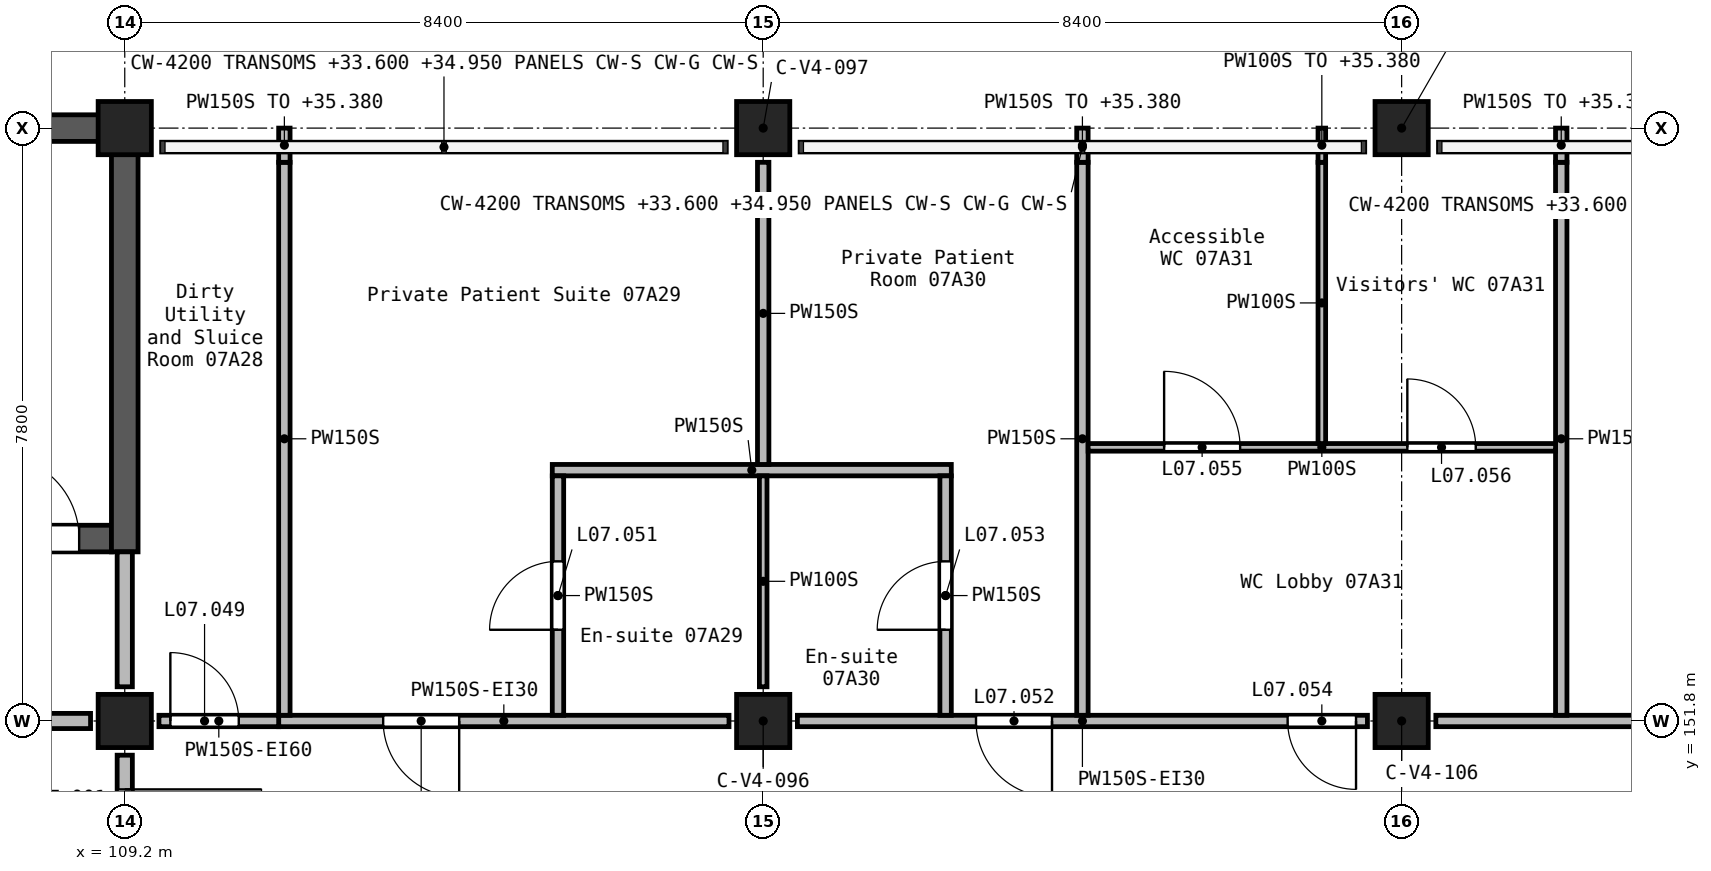
"""IFC4 building model, lengths in metres.
Left out: names, types, materials, properties, quantities, classifications, styles, units other than length and angle.
Written with IfcOpenShell. Run it as: python <this file> out.ifc"""

import sys

from ifc_helpers import new_model, si_unit, direction, frame, frame_2d, origin, origin_2d, place, context, subcontext, project, spatial, rectangle, extrude, element, fill, save


model = new_model("IFC4")
c1 = context("Model", 3, precision=1e-05, world=origin(), true_north=direction((0.0, 1.0)))
c2 = subcontext(c1, "Body", "Model", "MODEL_VIEW")
j1 = project(units=[si_unit("LENGTHUNIT", "METRE"), si_unit("PLANEANGLEUNIT", "RADIAN")], contexts=[c1])
p1 = place(None, origin())
s1 = spatial("IfcSite", under=j1, at=p1, CompositionType="ELEMENT")
p2 = place(p1, origin())
s2 = spatial("IfcBuilding", under=s1, at=p2, CompositionType="ELEMENT")
p3 = place(p2, frame((0.0, 0.0, 32.7)))
s3 = spatial("IfcBuildingStorey", under=s2, at=p3, CompositionType="ELEMENT", Elevation=32.7)
for number, where, z_axis, x_axis in (
    (1, (109.2, 151.8, 0.0), (0.0, 0.0, 1.0), (1.0, 0.0, 0.0)),
    (2, (109.2, 159.6, 0.0), (0.0, 0.0, 1.0), (1.0, 0.0, 0.0)),
    (3, (117.6, 151.8, 0.0), (0.0, 0.0, 1.0), (1.0, 0.0, 0.0)),
    (4, (117.6, 159.6, 0.0), (0.0, 0.0, 1.0), (1.0, 0.0, 0.0)),
    (5, (126.0, 151.8, 0.0), (0.0, 0.0, 1.0), (1.0, 0.0, 0.0)),
    (6, (126.0, 159.6, 0.0), (0.0, 0.0, 1.0), (1.0, 0.0, 0.0)),
):
    element("IfcColumn", number, at=place(p3, frame(where, z_axis=z_axis, x_axis=x_axis)), inside=s3, PredefinedType="COLUMN", context=c2, shape_type="SweptSolid", body=[
        extrude(rectangle(XDim=0.7, YDim=0.7, at=origin_2d()), origin(), (0.0, 0.0, 1.0), 3.9),
    ])
p4 = place(p3, frame((100.625, 159.6, 0.0), z_axis=(0.0, 0.0, 1.0), x_axis=(1.0, 0.0, 0.0)))
e7 = element("IfcWall", 7, at=p4, inside=s3, PredefinedType="SHEAR", context=c2, shape_type="SweptSolid", body=[
    extrude(rectangle(XDim=8.4, YDim=0.35, at=frame_2d((4.2, 0.0))), origin(), (0.0, 0.0, 1.0), 3.9),
])
p5 = place(p3, frame((100.975, 154.2, 0.0), z_axis=(0.0, 0.0, 1.0), x_axis=(1.0, 0.0, 0.0)))
e8 = element("IfcWall", 8, at=p5, inside=s3, PredefinedType="SHEAR", context=c2, shape_type="SweptSolid", body=[
    extrude(rectangle(XDim=8.05, YDim=0.35, at=frame_2d((4.025, 0.0))), origin(), (0.0, 0.0, 1.0), 3.9),
])
p6 = place(p5, frame((6.525, 0.0, 0.0)))
e9 = element("IfcOpeningElement", 9, at=p6, cuts=e8, PredefinedType="OPENING", context=c2, shape_type="SweptSolid", body=[
    extrude(rectangle(XDim=1.1, YDim=2.1, at=frame_2d((0.55, 1.05))), frame((0.0, 0.185, 0.0), z_axis=(0.0, -1.0, 0.0), x_axis=(1.0, 0.0, 0.0)), (0.0, 0.0, 1.0), 0.37),
])
p7 = place(p3, frame((109.2, 154.025, 0.0), z_axis=(0.0, 0.0, 1.0), x_axis=(0.0, 1.0, 0.0)))
e10 = element("IfcWall", 10, at=p7, inside=s3, PredefinedType="SHEAR", context=c2, shape_type="SweptSolid", body=[
    extrude(rectangle(XDim=5.75, YDim=0.35, at=frame_2d((2.875, 0.0))), origin(), (0.0, 0.0, 1.0), 3.9),
])
p8 = place(p3, frame((109.2, 154.025, 0.0), z_axis=(0.0, 0.0, 1.0), x_axis=(0.0, -1.0, 0.0)))
e11 = element("IfcWall", 11, at=p8, inside=s3, PredefinedType="SOLIDWALL", context=c2, shape_type="SweptSolid", body=[
    extrude(rectangle(XDim=1.775, YDim=0.2, at=frame_2d((0.887, 0.0))), origin(), (0.0, 0.0, 1.0), 3.6),
])
p9 = place(p3, frame((109.2, 151.35, 0.0), z_axis=(0.0, 0.0, 1.0), x_axis=(0.0, -1.0, 0.0)))
e12 = element("IfcWall", 12, at=p9, inside=s3, PredefinedType="SOLIDWALL", context=c2, shape_type="SweptSolid", body=[
    extrude(rectangle(XDim=2.7, YDim=0.2, at=frame_2d((1.35, 0.0))), origin(), (0.0, 0.0, 1.0), 3.6),
])
p10 = place(p9, frame((0.45, 0.0, 0.0)))
e13 = element("IfcOpeningElement", 13, at=p10, cuts=e12, PredefinedType="OPENING", context=c2, shape_type="SweptSolid", body=[
    extrude(rectangle(XDim=1.8, YDim=2.1, at=frame_2d((0.9, 1.05))), frame((0.0, 0.11, 0.0), z_axis=(0.0, -1.0, 0.0), x_axis=(1.0, 0.0, 0.0)), (0.0, 0.0, 1.0), 0.22),
])
p11 = place(p3, frame((101.25, 151.8, 0.0), z_axis=(0.0, 0.0, 1.0), x_axis=(1.0, 0.0, 0.0)))
e14 = element("IfcWall", 14, at=p11, inside=s3, PredefinedType="SOLIDWALL", context=c2, shape_type="SweptSolid", body=[
    extrude(rectangle(XDim=7.5, YDim=0.2, at=frame_2d((3.75, 0.0))), origin(), (0.0, 0.0, 1.0), 3.6),
])
p12 = place(p11, frame((3.2, 0.0, 0.0)))
e15 = element("IfcOpeningElement", 15, at=p12, cuts=e14, PredefinedType="OPENING", context=c2, shape_type="SweptSolid", body=[
    extrude(rectangle(XDim=1.1, YDim=2.1, at=frame_2d((0.55, 1.05))), frame((0.0, 0.11, 0.0), z_axis=(0.0, -1.0, 0.0), x_axis=(1.0, 0.0, 0.0)), (0.0, 0.0, 1.0), 0.22),
])
p13 = place(p3, frame((133.95, 151.8, 0.0), z_axis=(0.0, 0.0, 1.0), x_axis=(-1.0, 0.0, 0.0)))
e16 = element("IfcWall", 16, at=p13, inside=s3, PredefinedType="PARTITIONING", context=c2, shape_type="SweptSolid", body=[
    extrude(rectangle(XDim=7.5, YDim=0.15, at=frame_2d((3.75, 0.0))), origin(), (0.0, 0.0, 1.0), 3.6),
])
p14 = place(p13, frame((3.55, 0.0, 0.0)))
e17 = element("IfcOpeningElement", 17, at=p14, cuts=e16, PredefinedType="OPENING", context=c2, shape_type="SweptSolid", body=[
    extrude(rectangle(XDim=1.0, YDim=2.1, at=frame_2d((0.5, 1.05))), frame((0.0, 0.085, 0.0), z_axis=(0.0, -1.0, 0.0), x_axis=(1.0, 0.0, 0.0)), (0.0, 0.0, 1.0), 0.17),
])
p15 = place(p3, frame((125.55, 151.8, 0.0), z_axis=(0.0, 0.0, 1.0), x_axis=(-1.0, 0.0, 0.0)))
e18 = element("IfcWall", 18, at=p15, inside=s3, PredefinedType="PARTITIONING", context=c2, shape_type="SweptSolid", body=[
    extrude(rectangle(XDim=7.5, YDim=0.15, at=frame_2d((3.75, 0.0))), origin(), (0.0, 0.0, 1.0), 3.6),
])
p16 = place(p15, frame((4.15, 0.0, 0.0)))
e19 = element("IfcOpeningElement", 19, at=p16, cuts=e18, PredefinedType="OPENING", context=c2, shape_type="SweptSolid", body=[
    extrude(rectangle(XDim=1.0, YDim=2.1, at=frame_2d((0.5, 1.05))), frame((0.0, 0.085, 0.0), z_axis=(0.0, -1.0, 0.0), x_axis=(1.0, 0.0, 0.0)), (0.0, 0.0, 1.0), 0.17),
])
p17 = place(p15, frame((0.15, 0.0, 0.0)))
e20 = element("IfcOpeningElement", 20, at=p17, cuts=e18, PredefinedType="OPENING", context=c2, shape_type="SweptSolid", body=[
    extrude(rectangle(XDim=0.9, YDim=2.1, at=frame_2d((0.45, 1.05))), frame((0.0, 0.085, 0.0), z_axis=(0.0, -1.0, 0.0), x_axis=(1.0, 0.0, 0.0)), (0.0, 0.0, 1.0), 0.17),
])
p18 = place(p3, frame((117.15, 151.8, 0.0), z_axis=(0.0, 0.0, 1.0), x_axis=(-1.0, 0.0, 0.0)))
e21 = element("IfcWall", 21, at=p18, inside=s3, PredefinedType="PARTITIONING", context=c2, shape_type="SweptSolid", body=[
    extrude(rectangle(XDim=5.925, YDim=0.15, at=frame_2d((2.962, 0.0))), origin(), (0.0, 0.0, 1.0), 3.6),
])
p19 = place(p18, frame((3.55, 0.0, 0.0)))
e22 = element("IfcOpeningElement", 22, at=p19, cuts=e21, PredefinedType="OPENING", context=c2, shape_type="SweptSolid", body=[
    extrude(rectangle(XDim=1.0, YDim=2.1, at=frame_2d((0.5, 1.05))), frame((0.0, 0.085, 0.0), z_axis=(0.0, -1.0, 0.0), x_axis=(1.0, 0.0, 0.0)), (0.0, 0.0, 1.0), 0.17),
])
p20 = place(p3, frame((109.65, 151.8, 0.0), z_axis=(0.0, 0.0, 1.0), x_axis=(1.0, 0.0, 0.0)))
e23 = element("IfcWall", 23, at=p20, inside=s3, PredefinedType="PARTITIONING", context=c2, shape_type="SweptSolid", body=[
    extrude(rectangle(XDim=1.575, YDim=0.15, at=frame_2d((0.788, 0.0))), origin(), (0.0, 0.0, 1.0), 3.6),
])
p21 = place(p20, frame((0.15, 0.0, 0.0)))
e24 = element("IfcOpeningElement", 24, at=p21, cuts=e23, PredefinedType="OPENING", context=c2, shape_type="SweptSolid", body=[
    extrude(rectangle(XDim=0.9, YDim=2.1, at=frame_2d((0.45, 1.05))), frame((0.0, 0.085, 0.0), z_axis=(0.0, -1.0, 0.0), x_axis=(1.0, 0.0, 0.0)), (0.0, 0.0, 1.0), 0.17),
])
p22 = place(p3, frame((111.3, 151.875, 0.0), z_axis=(0.0, 0.0, 1.0), x_axis=(0.0, 1.0, 0.0)))
e25 = element("IfcWall", 25, at=p22, inside=s3, PredefinedType="PARTITIONING", context=c2, shape_type="SweptSolid", body=[
    extrude(rectangle(XDim=7.275, YDim=0.15, at=frame_2d((3.637, 0.0))), origin(), (0.0, 0.0, 1.0), 3.6),
])
p23 = place(p3, frame((111.3, 159.15, 0.0), z_axis=(0.0, 0.0, 1.0), x_axis=(0.0, 1.0, 0.0)))
e26 = element("IfcWall", 26, at=p23, inside=s3, PredefinedType="PARTITIONING", context=c2, shape_type="SweptSolid", body=[
    extrude(rectangle(XDim=0.45, YDim=0.15, at=frame_2d((0.225, 0.0))), origin(), (0.0, 0.0, 1.0), 2.68),
])
p24 = place(p3, frame((121.8, 151.875, 0.0), z_axis=(0.0, 0.0, 1.0), x_axis=(0.0, 1.0, 0.0)))
e27 = element("IfcWall", 27, at=p24, inside=s3, PredefinedType="PARTITIONING", context=c2, shape_type="SweptSolid", body=[
    extrude(rectangle(XDim=7.275, YDim=0.15, at=frame_2d((3.637, 0.0))), origin(), (0.0, 0.0, 1.0), 3.6),
])
p25 = place(p3, frame((121.8, 159.15, 0.0), z_axis=(0.0, 0.0, 1.0), x_axis=(0.0, 1.0, 0.0)))
e28 = element("IfcWall", 28, at=p25, inside=s3, PredefinedType="PARTITIONING", context=c2, shape_type="SweptSolid", body=[
    extrude(rectangle(XDim=0.45, YDim=0.15, at=frame_2d((0.225, 0.0))), origin(), (0.0, 0.0, 1.0), 2.68),
])
p26 = place(p3, frame((128.1, 151.875, 0.0), z_axis=(0.0, 0.0, 1.0), x_axis=(0.0, 1.0, 0.0)))
e29 = element("IfcWall", 29, at=p26, inside=s3, PredefinedType="PARTITIONING", context=c2, shape_type="SweptSolid", body=[
    extrude(rectangle(XDim=7.275, YDim=0.15, at=frame_2d((3.637, 0.0))), origin(), (0.0, 0.0, 1.0), 3.6),
])
p27 = place(p3, frame((128.1, 159.15, 0.0), z_axis=(0.0, 0.0, 1.0), x_axis=(0.0, 1.0, 0.0)))
e30 = element("IfcWall", 30, at=p27, inside=s3, PredefinedType="PARTITIONING", context=c2, shape_type="SweptSolid", body=[
    extrude(rectangle(XDim=0.45, YDim=0.15, at=frame_2d((0.225, 0.0))), origin(), (0.0, 0.0, 1.0), 2.68),
])
p28 = place(p3, frame((114.825, 155.1, 0.0), z_axis=(0.0, 0.0, 1.0), x_axis=(1.0, 0.0, 0.0)))
e31 = element("IfcWall", 31, at=p28, inside=s3, PredefinedType="PARTITIONING", context=c2, shape_type="SweptSolid", body=[
    extrude(rectangle(XDim=5.25, YDim=0.15, at=frame_2d((2.625, 0.0))), origin(), (0.0, 0.0, 1.0), 3.6),
])
p29 = place(p3, frame((117.6, 155.175, 0.0), z_axis=(0.0, 0.0, 1.0), x_axis=(0.0, 1.0, 0.0)))
e32 = element("IfcWall", 32, at=p29, inside=s3, PredefinedType="PARTITIONING", context=c2, shape_type="SweptSolid", body=[
    extrude(rectangle(XDim=3.975, YDim=0.15, at=frame_2d((1.987, 0.0))), origin(), (0.0, 0.0, 1.0), 3.6),
])
p30 = place(p3, frame((114.9, 151.875, 0.0), z_axis=(0.0, 0.0, 1.0), x_axis=(0.0, 1.0, 0.0)))
e33 = element("IfcWall", 33, at=p30, inside=s3, PredefinedType="PARTITIONING", context=c2, shape_type="SweptSolid", body=[
    extrude(rectangle(XDim=3.15, YDim=0.15, at=frame_2d((1.575, 0.0))), origin(), (0.0, 0.0, 1.0), 3.6),
])
p31 = place(p30, frame((1.125, 0.0, 0.0)))
e34 = element("IfcOpeningElement", 34, at=p31, cuts=e33, PredefinedType="OPENING", context=c2, shape_type="SweptSolid", body=[
    extrude(rectangle(XDim=0.9, YDim=2.1, at=frame_2d((0.45, 1.05))), frame((0.0, 0.085, 0.0), z_axis=(0.0, -1.0, 0.0), x_axis=(1.0, 0.0, 0.0)), (0.0, 0.0, 1.0), 0.17),
])
p32 = place(p3, frame((120.0, 151.875, 0.0), z_axis=(0.0, 0.0, 1.0), x_axis=(0.0, 1.0, 0.0)))
e35 = element("IfcWall", 35, at=p32, inside=s3, PredefinedType="PARTITIONING", context=c2, shape_type="SweptSolid", body=[
    extrude(rectangle(XDim=3.15, YDim=0.15, at=frame_2d((1.575, 0.0))), origin(), (0.0, 0.0, 1.0), 3.6),
])
p33 = place(p32, frame((1.125, 0.0, 0.0)))
e36 = element("IfcOpeningElement", 36, at=p33, cuts=e35, PredefinedType="OPENING", context=c2, shape_type="SweptSolid", body=[
    extrude(rectangle(XDim=0.9, YDim=2.1, at=frame_2d((0.45, 1.05))), frame((0.0, 0.085, 0.0), z_axis=(0.0, -1.0, 0.0), x_axis=(1.0, 0.0, 0.0)), (0.0, 0.0, 1.0), 0.17),
])
p34 = place(p3, frame((121.875, 155.4, 0.0), z_axis=(0.0, 0.0, 1.0), x_axis=(1.0, 0.0, 0.0)))
e37 = element("IfcWall", 37, at=p34, inside=s3, PredefinedType="PARTITIONING", context=c2, shape_type="SweptSolid", body=[
    extrude(rectangle(XDim=6.15, YDim=0.1, at=frame_2d((3.075, 0.0))), origin(), (0.0, 0.0, 1.0), 3.6),
])
p35 = place(p34, frame((1.0, 0.0, 0.0)))
e38 = element("IfcOpeningElement", 38, at=p35, cuts=e37, PredefinedType="OPENING", context=c2, shape_type="SweptSolid", body=[
    extrude(rectangle(XDim=1.0, YDim=2.1, at=frame_2d((0.5, 1.05))), frame((0.0, 0.06, 0.0), z_axis=(0.0, -1.0, 0.0), x_axis=(1.0, 0.0, 0.0)), (0.0, 0.0, 1.0), 0.12),
])
p36 = place(p34, frame((4.2, 0.0, 0.0)))
e39 = element("IfcOpeningElement", 39, at=p36, cuts=e37, PredefinedType="OPENING", context=c2, shape_type="SweptSolid", body=[
    extrude(rectangle(XDim=0.9, YDim=2.1, at=frame_2d((0.45, 1.05))), frame((0.0, 0.06, 0.0), z_axis=(0.0, -1.0, 0.0), x_axis=(1.0, 0.0, 0.0)), (0.0, 0.0, 1.0), 0.12),
])
p37 = place(p3, frame((124.95, 155.45, 0.0), z_axis=(0.0, 0.0, 1.0), x_axis=(0.0, 1.0, 0.0)))
e40 = element("IfcWall", 40, at=p37, inside=s3, PredefinedType="PARTITIONING", context=c2, shape_type="SweptSolid", body=[
    extrude(rectangle(XDim=3.7, YDim=0.1, at=frame_2d((1.85, 0.0))), origin(), (0.0, 0.0, 1.0), 3.6),
])
p38 = place(p3, frame((124.95, 159.15, 0.0), z_axis=(0.0, 0.0, 1.0), x_axis=(0.0, 1.0, 0.0)))
e41 = element("IfcWall", 41, at=p38, inside=s3, PredefinedType="PARTITIONING", context=c2, shape_type="SweptSolid", body=[
    extrude(rectangle(XDim=0.45, YDim=0.1, at=frame_2d((0.225, 0.0))), origin(), (0.0, 0.0, 1.0), 2.68),
])
p39 = place(p3, frame((117.6, 152.25, 0.0), z_axis=(0.0, 0.0, 1.0), x_axis=(0.0, 1.0, 0.0)))
e42 = element("IfcWall", 42, at=p39, inside=s3, PredefinedType="PARTITIONING", context=c2, shape_type="SweptSolid", body=[
    extrude(rectangle(XDim=2.775, YDim=0.1, at=frame_2d((1.387, 0.0))), origin(), (0.0, 0.0, 1.0), 3.6),
])
p40 = place(p10, origin())
e43 = element("IfcDoor", 43, at=p40, inside=s3, OperationType="DOUBLE_DOOR_SINGLE_SWING", PredefinedType="DOOR", context=c2, shape_type="SweptSolid", body=[
    extrude(rectangle(XDim=1.8, YDim=2.1, at=frame_2d((0.9, 1.05))), frame((0.0, 0.025, 0.0), z_axis=(0.0, -1.0, 0.0), x_axis=(1.0, 0.0, 0.0)), (0.0, 0.0, 1.0), 0.05),
])
fill(e13, e43)
p41 = place(p21, origin())
e44 = element("IfcDoor", 44, at=p41, inside=s3, OperationType="SINGLE_SWING_LEFT", PredefinedType="DOOR", context=c2, shape_type="SweptSolid", body=[
    extrude(rectangle(XDim=0.9, YDim=2.1, at=frame_2d((0.45, 1.05))), frame((0.0, 0.025, 0.0), z_axis=(0.0, -1.0, 0.0), x_axis=(1.0, 0.0, 0.0)), (0.0, 0.0, 1.0), 0.05),
])
fill(e24, e44)
p42 = place(p19, frame((1.0, 0.0, 0.0), z_axis=(0.0, 0.0, 1.0), x_axis=(-1.0, 0.0, 0.0)))
e45 = element("IfcDoor", 45, at=p42, inside=s3, OperationType="SINGLE_SWING_LEFT", PredefinedType="DOOR", context=c2, shape_type="SweptSolid", body=[
    extrude(rectangle(XDim=1.0, YDim=2.1, at=frame_2d((0.5, 1.05))), frame((0.0, 0.025, 0.0), z_axis=(0.0, -1.0, 0.0), x_axis=(1.0, 0.0, 0.0)), (0.0, 0.0, 1.0), 0.05),
])
fill(e22, e45)
p43 = place(p31, frame((0.9, 0.0, 0.0), z_axis=(0.0, 0.0, 1.0), x_axis=(-1.0, 0.0, 0.0)))
e46 = element("IfcDoor", 46, at=p43, inside=s3, OperationType="SINGLE_SWING_LEFT", PredefinedType="DOOR", context=c2, shape_type="SweptSolid", body=[
    extrude(rectangle(XDim=0.9, YDim=2.1, at=frame_2d((0.45, 1.05))), frame((0.0, 0.025, 0.0), z_axis=(0.0, -1.0, 0.0), x_axis=(1.0, 0.0, 0.0)), (0.0, 0.0, 1.0), 0.05),
])
fill(e34, e46)
p44 = place(p16, frame((1.0, 0.0, 0.0), z_axis=(0.0, 0.0, 1.0), x_axis=(-1.0, 0.0, 0.0)))
e47 = element("IfcDoor", 47, at=p44, inside=s3, OperationType="SINGLE_SWING_LEFT", PredefinedType="DOOR", context=c2, shape_type="SweptSolid", body=[
    extrude(rectangle(XDim=1.0, YDim=2.1, at=frame_2d((0.5, 1.05))), frame((0.0, 0.025, 0.0), z_axis=(0.0, -1.0, 0.0), x_axis=(1.0, 0.0, 0.0)), (0.0, 0.0, 1.0), 0.05),
])
fill(e19, e47)
p45 = place(p33, origin())
e48 = element("IfcDoor", 48, at=p45, inside=s3, OperationType="SINGLE_SWING_RIGHT", PredefinedType="DOOR", context=c2, shape_type="SweptSolid", body=[
    extrude(rectangle(XDim=0.9, YDim=2.1, at=frame_2d((0.45, 1.05))), frame((0.0, 0.025, 0.0), z_axis=(0.0, -1.0, 0.0), x_axis=(1.0, 0.0, 0.0)), (0.0, 0.0, 1.0), 0.05),
])
fill(e36, e48)
p46 = place(p17, frame((0.9, 0.0, 0.0), z_axis=(0.0, 0.0, 1.0), x_axis=(-1.0, 0.0, 0.0)))
e49 = element("IfcDoor", 49, at=p46, inside=s3, OperationType="SINGLE_SWING_RIGHT", PredefinedType="DOOR", context=c2, shape_type="SweptSolid", body=[
    extrude(rectangle(XDim=0.9, YDim=2.1, at=frame_2d((0.45, 1.05))), frame((0.0, 0.025, 0.0), z_axis=(0.0, -1.0, 0.0), x_axis=(1.0, 0.0, 0.0)), (0.0, 0.0, 1.0), 0.05),
])
fill(e20, e49)
p47 = place(p35, origin())
e50 = element("IfcDoor", 50, at=p47, inside=s3, OperationType="SINGLE_SWING_LEFT", PredefinedType="DOOR", context=c2, shape_type="SweptSolid", body=[
    extrude(rectangle(XDim=1.0, YDim=2.1, at=frame_2d((0.5, 1.05))), frame((0.0, 0.025, 0.0), z_axis=(0.0, -1.0, 0.0), x_axis=(1.0, 0.0, 0.0)), (0.0, 0.0, 1.0), 0.05),
])
fill(e38, e50)
p48 = place(p36, origin())
e51 = element("IfcDoor", 51, at=p48, inside=s3, OperationType="SINGLE_SWING_RIGHT", PredefinedType="DOOR", context=c2, shape_type="SweptSolid", body=[
    extrude(rectangle(XDim=0.9, YDim=2.1, at=frame_2d((0.45, 1.05))), frame((0.0, 0.025, 0.0), z_axis=(0.0, -1.0, 0.0), x_axis=(1.0, 0.0, 0.0)), (0.0, 0.0, 1.0), 0.05),
])
fill(e39, e51)
p49 = place(p6, origin())
e52 = element("IfcDoor", 52, at=p49, inside=s3, OperationType="SINGLE_SWING_RIGHT", PredefinedType="DOOR", context=c2, shape_type="SweptSolid", body=[
    extrude(rectangle(XDim=1.1, YDim=2.1, at=frame_2d((0.55, 1.05))), frame((0.0, 0.025, 0.0), z_axis=(0.0, -1.0, 0.0), x_axis=(1.0, 0.0, 0.0)), (0.0, 0.0, 1.0), 0.05),
])
fill(e9, e52)
save(model, sys.argv[1])
